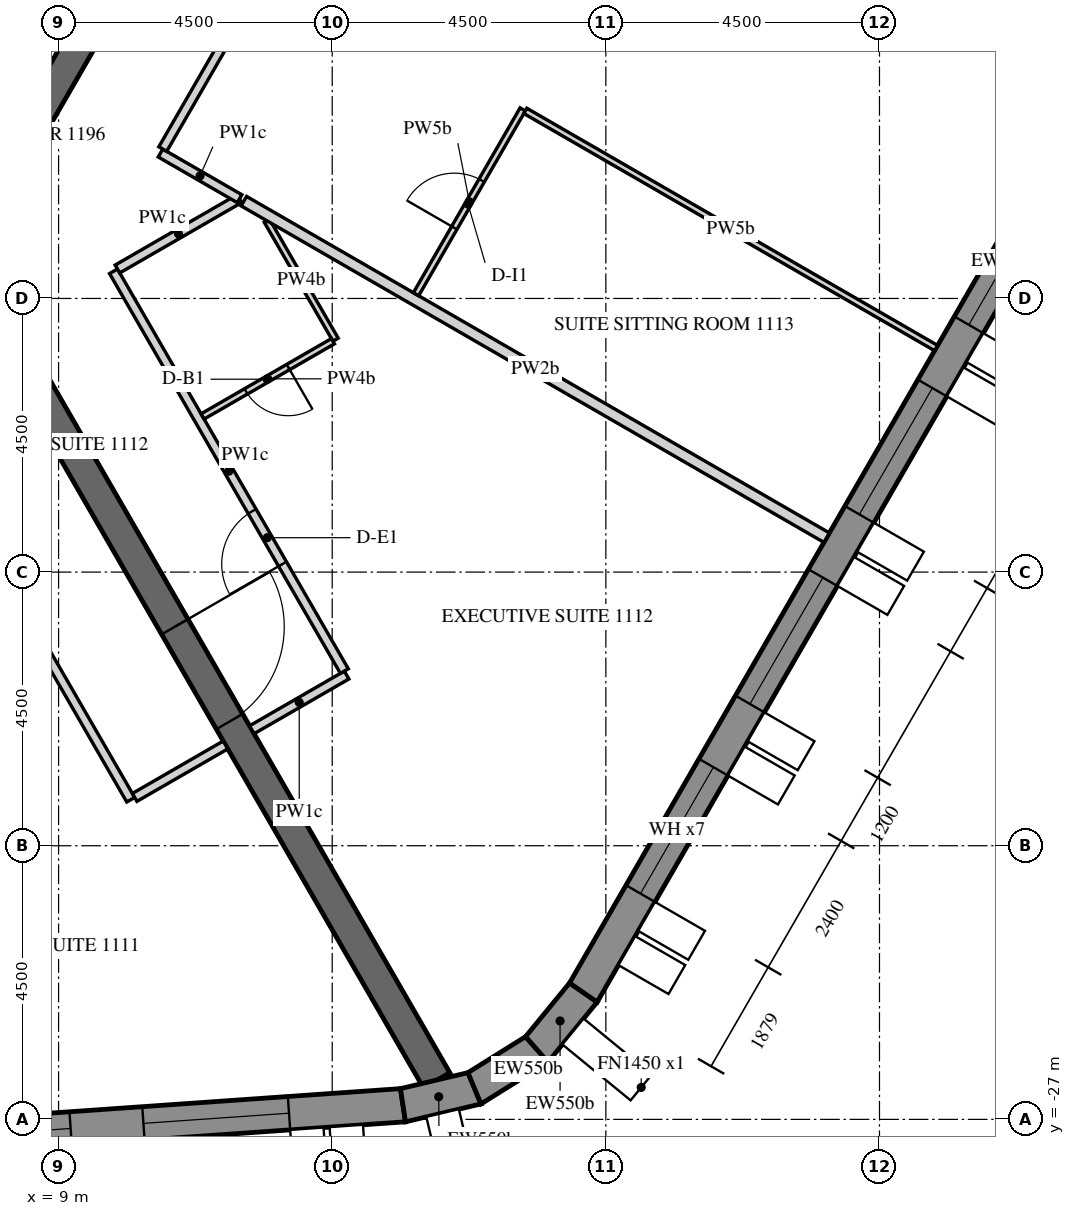
"""IFC4 building model, lengths in metres.
Left out: names, types, materials, properties, quantities, classifications, styles, units other than length and angle.
Written with IfcOpenShell. Run it as: python <this file> out.ifc"""

import sys

from ifc_helpers import new_model, si_unit, direction, frame, frame_2d, origin, place, context, subcontext, project, spatial, polyline, rectangle, outline, extrude, element, fill, save


model = new_model("IFC4")
c1 = context("Model", 3, precision=1e-05, world=origin(), true_north=direction((0.0, 1.0)))
c2 = subcontext(c1, "Body", "Model", "MODEL_VIEW")
j1 = project(units=[si_unit("LENGTHUNIT", "METRE"), si_unit("PLANEANGLEUNIT", "RADIAN")], contexts=[c1])
p1 = place(None, origin())
s1 = spatial("IfcSite", under=j1, at=p1, CompositionType="ELEMENT")
p2 = place(p1, origin())
s2 = spatial("IfcBuilding", under=s1, at=p2, CompositionType="ELEMENT")
p3 = place(p2, frame((0.0, 0.0, 152.7)))
s3 = spatial("IfcBuildingStorey", under=s2, at=p3, CompositionType="ELEMENT", Elevation=152.7)
p4 = place(p3, frame((-13.026, -28.704, 0.0), z_axis=(0.0, 0.0, 1.0), x_axis=(0.99756406806, 0.069756219185, 0.0)))
e1 = element("IfcWall", 1, at=p4, inside=s3, PredefinedType="SOLIDWALL", context=c2, shape_type="SweptSolid", body=[
    extrude(outline(polyline([(-0.026, -0.275), (27.78, -0.275), (27.735, 0.275), (0.026, 0.275), (-0.026, -0.275)])), origin(), (0.0, 0.0, 1.0), 3.75),
])
p5 = place(p4, frame((1.879, 0.0, 0.9)))
e2 = element("IfcOpeningElement", 2, at=p5, cuts=e1, PredefinedType="OPENING", context=c2, shape_type="SweptSolid", body=[
    extrude(rectangle(XDim=2.4, YDim=2.4, at=frame_2d((1.2, 1.2))), frame((0.0, 0.285, 0.0), z_axis=(0.0, -1.0, 0.0), x_axis=(1.0, 0.0, 0.0)), (0.0, 0.0, 1.0), 0.57),
])
p6 = place(p4, frame((5.479, 0.0, 0.9)))
e3 = element("IfcOpeningElement", 3, at=p6, cuts=e1, PredefinedType="OPENING", context=c2, shape_type="SweptSolid", body=[
    extrude(rectangle(XDim=2.4, YDim=2.4, at=frame_2d((1.2, 1.2))), frame((0.0, 0.285, 0.0), z_axis=(0.0, -1.0, 0.0), x_axis=(1.0, 0.0, 0.0)), (0.0, 0.0, 1.0), 0.57),
])
p7 = place(p4, frame((9.079, 0.0, 0.9)))
e4 = element("IfcOpeningElement", 4, at=p7, cuts=e1, PredefinedType="OPENING", context=c2, shape_type="SweptSolid", body=[
    extrude(rectangle(XDim=2.4, YDim=2.4, at=frame_2d((1.2, 1.2))), frame((0.0, 0.285, 0.0), z_axis=(0.0, -1.0, 0.0), x_axis=(1.0, 0.0, 0.0)), (0.0, 0.0, 1.0), 0.57),
])
p8 = place(p4, frame((12.679, 0.0, 0.9)))
e5 = element("IfcOpeningElement", 5, at=p8, cuts=e1, PredefinedType="OPENING", context=c2, shape_type="SweptSolid", body=[
    extrude(rectangle(XDim=2.4, YDim=2.4, at=frame_2d((1.2, 1.2))), frame((0.0, 0.285, 0.0), z_axis=(0.0, -1.0, 0.0), x_axis=(1.0, 0.0, 0.0)), (0.0, 0.0, 1.0), 0.57),
])
p9 = place(p4, frame((16.279, 0.0, 0.9)))
e6 = element("IfcOpeningElement", 6, at=p9, cuts=e1, PredefinedType="OPENING", context=c2, shape_type="SweptSolid", body=[
    extrude(rectangle(XDim=2.4, YDim=2.4, at=frame_2d((1.2, 1.2))), frame((0.0, 0.285, 0.0), z_axis=(0.0, -1.0, 0.0), x_axis=(1.0, 0.0, 0.0)), (0.0, 0.0, 1.0), 0.57),
])
p10 = place(p4, frame((19.879, 0.0, 0.9)))
e7 = element("IfcOpeningElement", 7, at=p10, cuts=e1, PredefinedType="OPENING", context=c2, shape_type="SweptSolid", body=[
    extrude(rectangle(XDim=2.4, YDim=2.4, at=frame_2d((1.2, 1.2))), frame((0.0, 0.285, 0.0), z_axis=(0.0, -1.0, 0.0), x_axis=(1.0, 0.0, 0.0)), (0.0, 0.0, 1.0), 0.57),
])
p11 = place(p4, frame((23.479, 0.0, 0.9)))
e8 = element("IfcOpeningElement", 8, at=p11, cuts=e1, PredefinedType="OPENING", context=c2, shape_type="SweptSolid", body=[
    extrude(rectangle(XDim=2.4, YDim=2.4, at=frame_2d((1.2, 1.2))), frame((0.0, 0.285, 0.0), z_axis=(0.0, -1.0, 0.0), x_axis=(1.0, 0.0, 0.0)), (0.0, 0.0, 1.0), 0.57),
])
p12 = place(p3, frame((14.664, -26.767, 0.0), z_axis=(0.0, 0.0, 1.0), x_axis=(0.973063591128, 0.230536868247, 0.0)))
e9 = element("IfcWall", 9, at=p12, inside=s3, PredefinedType="SOLIDWALL", context=c2, shape_type="SweptSolid", body=[
    extrude(outline(polyline([(-0.022, -0.275), (1.253, -0.275), (1.163, 0.275), (0.022, 0.275), (-0.022, -0.275)])), origin(), (0.0, 0.0, 1.0), 3.75),
])
p13 = place(p3, frame((15.84, -26.489, 0.0), z_axis=(0.0, 0.0, 1.0), x_axis=(0.848009655012, 0.52998077796, 0.0)))
e10 = element("IfcWall", 10, at=p13, inside=s3, PredefinedType="SOLIDWALL", context=c2, shape_type="SweptSolid", body=[
    extrude(outline(polyline([(-0.045, -0.275), (1.253, -0.275), (1.163, 0.275), (0.045, 0.275), (-0.045, -0.275)])), origin(), (0.0, 0.0, 1.0), 3.75),
])
p14 = place(p3, frame((16.864, -25.848, 0.0), z_axis=(0.0, 0.0, 1.0), x_axis=(0.633842757806, 0.773461930787, 0.0)))
e11 = element("IfcWall", 11, at=p14, inside=s3, PredefinedType="SOLIDWALL", context=c2, shape_type="SweptSolid", body=[
    extrude(outline(polyline([(-0.045, -0.275), (1.231, -0.275), (1.186, 0.275), (0.045, 0.275), (-0.045, -0.275)])), origin(), (0.0, 0.0, 1.0), 3.75),
])
p15 = place(p3, frame((17.63, -24.914, 0.0), z_axis=(0.0, 0.0, 1.0), x_axis=(0.499998569178, 0.866026229868, 0.0)))
e12 = element("IfcWall", 12, at=p15, inside=s3, PredefinedType="SOLIDWALL", context=c2, shape_type="SweptSolid", body=[
    extrude(outline(polyline([(-0.022, -0.275), (27.783, -0.275), (27.732, 0.275), (0.022, 0.275), (-0.022, -0.275)])), origin(), (0.0, 0.0, 1.0), 3.75),
])
p16 = place(p15, frame((1.879, 0.0, 0.9)))
e13 = element("IfcOpeningElement", 13, at=p16, cuts=e12, PredefinedType="OPENING", context=c2, shape_type="SweptSolid", body=[
    extrude(rectangle(XDim=2.4, YDim=2.4, at=frame_2d((1.2, 1.2))), frame((0.0, 0.285, 0.0), z_axis=(0.0, -1.0, 0.0), x_axis=(1.0, 0.0, 0.0)), (0.0, 0.0, 1.0), 0.57),
])
p17 = place(p15, frame((5.479, 0.0, 0.9)))
e14 = element("IfcOpeningElement", 14, at=p17, cuts=e12, PredefinedType="OPENING", context=c2, shape_type="SweptSolid", body=[
    extrude(rectangle(XDim=2.4, YDim=2.4, at=frame_2d((1.2, 1.2))), frame((0.0, 0.285, 0.0), z_axis=(0.0, -1.0, 0.0), x_axis=(1.0, 0.0, 0.0)), (0.0, 0.0, 1.0), 0.57),
])
p18 = place(p15, frame((9.079, 0.0, 0.9)))
e15 = element("IfcOpeningElement", 15, at=p18, cuts=e12, PredefinedType="OPENING", context=c2, shape_type="SweptSolid", body=[
    extrude(rectangle(XDim=2.4, YDim=2.4, at=frame_2d((1.2, 1.2))), frame((0.0, 0.285, 0.0), z_axis=(0.0, -1.0, 0.0), x_axis=(1.0, 0.0, 0.0)), (0.0, 0.0, 1.0), 0.57),
])
p19 = place(p15, frame((12.679, 0.0, 0.9)))
e16 = element("IfcOpeningElement", 16, at=p19, cuts=e12, PredefinedType="OPENING", context=c2, shape_type="SweptSolid", body=[
    extrude(rectangle(XDim=2.4, YDim=2.4, at=frame_2d((1.2, 1.2))), frame((0.0, 0.285, 0.0), z_axis=(0.0, -1.0, 0.0), x_axis=(1.0, 0.0, 0.0)), (0.0, 0.0, 1.0), 0.57),
])
p20 = place(p15, frame((16.279, 0.0, 0.9)))
e17 = element("IfcOpeningElement", 17, at=p20, cuts=e12, PredefinedType="OPENING", context=c2, shape_type="SweptSolid", body=[
    extrude(rectangle(XDim=2.4, YDim=2.4, at=frame_2d((1.2, 1.2))), frame((0.0, 0.285, 0.0), z_axis=(0.0, -1.0, 0.0), x_axis=(1.0, 0.0, 0.0)), (0.0, 0.0, 1.0), 0.57),
])
p21 = place(p15, frame((19.879, 0.0, 0.9)))
e18 = element("IfcOpeningElement", 18, at=p21, cuts=e12, PredefinedType="OPENING", context=c2, shape_type="SweptSolid", body=[
    extrude(rectangle(XDim=2.4, YDim=2.4, at=frame_2d((1.2, 1.2))), frame((0.0, 0.285, 0.0), z_axis=(0.0, -1.0, 0.0), x_axis=(1.0, 0.0, 0.0)), (0.0, 0.0, 1.0), 0.57),
])
p22 = place(p15, frame((23.479, 0.0, 0.9)))
e19 = element("IfcOpeningElement", 19, at=p22, cuts=e12, PredefinedType="OPENING", context=c2, shape_type="SweptSolid", body=[
    extrude(rectangle(XDim=2.4, YDim=2.4, at=frame_2d((1.2, 1.2))), frame((0.0, 0.285, 0.0), z_axis=(0.0, -1.0, 0.0), x_axis=(1.0, 0.0, 0.0)), (0.0, 0.0, 1.0), 0.57),
])
p23 = place(p3, frame((7.361, -12.75, 0.0), z_axis=(0.0, 0.0, 1.0), x_axis=(0.50000571537, 0.866022103989, 0.0)))
e20 = element("IfcWall", 20, at=p23, inside=s3, PredefinedType="SHEAR", context=c2, shape_type="SweptSolid", body=[
    extrude(outline(polyline([(-0.144, -0.25), (14.867, -0.25), (14.578, 0.25), (0.144, 0.25), (-0.144, -0.25)])), origin(), (0.0, 0.0, 1.0), 3.75),
])
p24 = place(p23, frame((6.49, 0.0, 0.0)))
e21 = element("IfcOpeningElement", 21, at=p24, cuts=e20, PredefinedType="OPENING", context=c2, shape_type="SweptSolid", body=[
    extrude(rectangle(XDim=1.8, YDim=2.4, at=frame_2d((0.9, 1.2))), frame((0.0, 0.26, 0.0), z_axis=(0.0, -1.0, 0.0), x_axis=(1.0, 0.0, 0.0)), (0.0, 0.0, 1.0), 0.52),
])
p25 = place(p3, frame((7.506, -13.0, 0.0), z_axis=(0.0, 0.0, 1.0), x_axis=(0.499988271576, -0.866032175087, 0.0)))
e22 = element("IfcWall", 22, at=p25, inside=s3, PredefinedType="SHEAR", context=c2, shape_type="SweptSolid", body=[
    extrude(rectangle(XDim=15.424, YDim=0.5, at=frame_2d((7.712, 0.0))), origin(), (0.0, 0.0, 1.0), 3.75),
])
p26 = place(p25, frame((6.812, 0.0, 0.0)))
e23 = element("IfcOpeningElement", 23, at=p26, cuts=e22, PredefinedType="OPENING", context=c2, shape_type="SweptSolid", body=[
    extrude(rectangle(XDim=1.8, YDim=2.4, at=frame_2d((0.9, 1.2))), frame((0.0, 0.26, 0.0), z_axis=(0.0, -1.0, 0.0), x_axis=(1.0, 0.0, 0.0)), (0.0, 0.0, 1.0), 0.52),
])
p27 = place(p3, frame((5.673, -9.825, 0.0), z_axis=(0.0, 0.0, 1.0), x_axis=(0.499995046907, 0.866028263435, 0.0)))
e24 = element("IfcWall", 24, at=p27, inside=s3, PredefinedType="SHEAR", context=c2, shape_type="SweptSolid", body=[
    extrude(outline(polyline([(-0.101, -0.175), (11.446, -0.175), (11.244, 0.175), (0.101, 0.175), (-0.101, -0.175)])), origin(), (0.0, 0.0, 1.0), 3.75),
])
p28 = place(p27, frame((4.801, 0.0, 0.0)))
e25 = element("IfcOpeningElement", 25, at=p28, cuts=e24, PredefinedType="OPENING", context=c2, shape_type="SweptSolid", body=[
    extrude(rectangle(XDim=1.8, YDim=2.4, at=frame_2d((0.9, 1.2))), frame((0.0, 0.185, 0.0), z_axis=(0.0, -1.0, 0.0), x_axis=(1.0, 0.0, 0.0)), (0.0, 0.0, 1.0), 0.37),
])
p29 = place(p3, frame((6.178, -14.8, 0.0), z_axis=(0.0, 0.0, 1.0), x_axis=(0.499984309814, -0.866034462328, 0.0)))
e26 = element("IfcWall", 26, at=p29, inside=s3, PredefinedType="PARTITIONING", context=c2, shape_type="SweptSolid", body=[
    extrude(rectangle(XDim=8.017, YDim=0.15, at=frame_2d((4.008, 0.0))), origin(), (0.0, 0.0, 1.0), 2.823),
])
p30 = place(p3, frame((10.251, -21.705, 0.0), z_axis=(0.0, 0.0, 1.0), x_axis=(0.866013532718, 0.500020560727, 0.0)))
e27 = element("IfcWall", 27, at=p30, inside=s3, PredefinedType="PARTITIONING", context=c2, shape_type="SweptSolid", body=[
    extrude(rectangle(XDim=1.725, YDim=0.15, at=frame_2d((0.863, 0.0))), origin(), (0.0, 0.0, 1.0), 2.823),
])
p31 = place(p3, frame((12.178, -20.593, 0.0), z_axis=(0.0, 0.0, 1.0), x_axis=(0.866047807691, 0.499961193289, 0.0)))
e28 = element("IfcWall", 28, at=p31, inside=s3, PredefinedType="PARTITIONING", context=c2, shape_type="SweptSolid", body=[
    extrude(rectangle(XDim=1.8, YDim=0.15, at=frame_2d((0.9, 0.0))), origin(), (0.0, 0.0, 1.0), 2.823),
])
p32 = place(p3, frame((13.699, -19.628, 0.0), z_axis=(0.0, 0.0, 1.0), x_axis=(-0.499998968938, 0.866025999068, 0.0)))
e29 = element("IfcWall", 29, at=p32, inside=s3, PredefinedType="PARTITIONING", context=c2, shape_type="SweptSolid", body=[
    extrude(rectangle(XDim=7.592, YDim=0.15, at=frame_2d((3.796, 0.0))), origin(), (0.0, 0.0, 1.0), 2.823),
])
p33 = place(p32, frame((2.033, 0.0, 0.0)))
e30 = element("IfcOpeningElement", 30, at=p33, cuts=e29, PredefinedType="OPENING", context=c2, shape_type="SweptSolid", body=[
    extrude(rectangle(XDim=1.0, YDim=2.1, at=frame_2d((0.5, 1.05))), frame((0.0, 0.085, 0.0), z_axis=(0.0, -1.0, 0.0), x_axis=(1.0, 0.0, 0.0)), (0.0, 0.0, 1.0), 0.17),
])
p34 = place(p3, frame((9.968, -13.016, 0.0), z_axis=(0.0, 0.0, 1.0), x_axis=(0.866022320763, 0.500005339912, 0.0)))
e31 = element("IfcWall", 31, at=p34, inside=s3, PredefinedType="PARTITIONING", context=c2, shape_type="SweptSolid", body=[
    extrude(rectangle(XDim=2.316, YDim=0.15, at=frame_2d((1.158, 0.0))), origin(), (0.0, 0.0, 1.0), 2.823),
])
p35 = place(p3, frame((11.977, -11.859, 0.0), z_axis=(0.0, 0.0, 1.0), x_axis=(-0.865993364801, 0.500055489042, 0.0)))
e32 = element("IfcWall", 32, at=p35, inside=s3, PredefinedType="PARTITIONING", context=c2, shape_type="SweptSolid", body=[
    extrude(rectangle(XDim=1.502, YDim=0.15, at=frame_2d((0.751, 0.0))), origin(), (0.0, 0.0, 1.0), 2.823),
])
p36 = place(p3, frame((10.714, -11.043, 0.0), z_axis=(0.0, 0.0, 1.0), x_axis=(0.500001980452, 0.866024260367, 0.0)))
e33 = element("IfcWall", 33, at=p36, inside=s3, PredefinedType="PARTITIONING", context=c2, shape_type="SweptSolid", body=[
    extrude(rectangle(XDim=12.752, YDim=0.15, at=frame_2d((6.376, 0.0))), origin(), (0.0, 0.0, 1.0), 2.823),
])
p37 = place(p36, frame((3.625, 0.0, 0.0)))
e34 = element("IfcOpeningElement", 34, at=p37, cuts=e33, PredefinedType="OPENING", context=c2, shape_type="SweptSolid", body=[
    extrude(rectangle(XDim=1.0, YDim=2.1, at=frame_2d((0.5, 1.05))), frame((0.0, 0.085, 0.0), z_axis=(0.0, -1.0, 0.0), x_axis=(1.0, 0.0, 0.0)), (0.0, 0.0, 1.0), 0.17),
])
p38 = place(p36, frame((11.602, 0.0, 0.0)))
e35 = element("IfcOpeningElement", 35, at=p38, cuts=e33, PredefinedType="OPENING", context=c2, shape_type="SweptSolid", body=[
    extrude(rectangle(XDim=1.0, YDim=2.1, at=frame_2d((0.5, 1.05))), frame((0.0, 0.085, 0.0), z_axis=(0.0, -1.0, 0.0), x_axis=(1.0, 0.0, 0.0)), (0.0, 0.0, 1.0), 0.17),
])
p39 = place(p3, frame((12.426, -12.223, 0.0), z_axis=(0.0, 0.0, 1.0), x_axis=(0.499919032186, -0.866072145528, 0.0)))
e36 = element("IfcWall", 36, at=p39, inside=s3, PredefinedType="PARTITIONING", context=c2, shape_type="SweptSolid", body=[
    extrude(rectangle(XDim=2.258, YDim=0.1, at=frame_2d((1.129, 0.0))), origin(), (0.0, 0.0, 1.0), 2.823),
])
p40 = place(p3, frame((13.512, -14.203, 0.0), z_axis=(0.0, 0.0, 1.0), x_axis=(-0.866006523861, -0.500032699561, 0.0)))
e37 = element("IfcWall", 37, at=p40, inside=s3, PredefinedType="PARTITIONING", context=c2, shape_type="SweptSolid", body=[
    extrude(rectangle(XDim=2.475, YDim=0.1, at=frame_2d((1.237, 0.0))), origin(), (0.0, 0.0, 1.0), 2.823),
])
p41 = place(p40, frame((0.85, 0.0, 0.0)))
e38 = element("IfcOpeningElement", 38, at=p41, cuts=e37, PredefinedType="OPENING", context=c2, shape_type="SweptSolid", body=[
    extrude(rectangle(XDim=0.8, YDim=2.1, at=frame_2d((0.4, 1.05))), frame((0.0, 0.06, 0.0), z_axis=(0.0, -1.0, 0.0), x_axis=(1.0, 0.0, 0.0)), (0.0, 0.0, 1.0), 0.12),
])
p42 = place(p3, frame((21.631, -17.433, 0.0), z_axis=(0.0, 0.0, 1.0), x_axis=(-0.866031296205, 0.499989793889, 0.0)))
e39 = element("IfcWall", 39, at=p42, inside=s3, PredefinedType="PARTITIONING", context=c2, shape_type="SweptSolid", body=[
    extrude(rectangle(XDim=11.067, YDim=0.18, at=frame_2d((5.534, 0.0))), origin(), (0.0, 0.0, 1.0), 2.823),
])
p43 = place(p3, frame((14.878, -13.43, 0.0), z_axis=(0.0, 0.0, 1.0), x_axis=(0.500021481416, 0.866013001128, 0.0)))
e40 = element("IfcWall", 40, at=p43, inside=s3, PredefinedType="PARTITIONING", context=c2, shape_type="SweptSolid", body=[
    extrude(rectangle(XDim=3.51, YDim=0.1, at=frame_2d((1.755, 0.0))), origin(), (0.0, 0.0, 1.0), 2.823),
])
p44 = place(p43, frame((1.26, 0.0, 0.0)))
e41 = element("IfcOpeningElement", 41, at=p44, cuts=e40, PredefinedType="OPENING", context=c2, shape_type="SweptSolid", body=[
    extrude(rectangle(XDim=0.9, YDim=2.1, at=frame_2d((0.45, 1.05))), frame((0.0, 0.06, 0.0), z_axis=(0.0, -1.0, 0.0), x_axis=(1.0, 0.0, 0.0)), (0.0, 0.0, 1.0), 0.12),
])
p45 = place(p3, frame((16.676, -10.416, 0.0), z_axis=(0.0, 0.0, 1.0), x_axis=(0.866034953203, -0.499983459557, 0.0)))
e42 = element("IfcWall", 42, at=p45, inside=s3, PredefinedType="PARTITIONING", context=c2, shape_type="SweptSolid", body=[
    extrude(rectangle(XDim=7.8, YDim=0.1, at=frame_2d((3.9, 0.0))), origin(), (0.0, 0.0, 1.0), 2.823),
])
p46 = place(p10, frame((0.0, 0.205, 0.0)))
e43 = element("IfcWindow", 43, at=p46, inside=s3, PartitioningType="DOUBLE_PANEL_VERTICAL", PredefinedType="WINDOW", context=c2, shape_type="SweptSolid", body=[
    extrude(rectangle(XDim=2.4, YDim=2.4, at=frame_2d((1.2, 1.2))), frame((0.0, 0.03, 0.0), z_axis=(0.0, -1.0, 0.0), x_axis=(1.0, 0.0, 0.0)), (0.0, 0.0, 1.0), 0.06),
])
fill(e7, e43)
p47 = place(p11, frame((0.0, 0.205, 0.0)))
e44 = element("IfcWindow", 44, at=p47, inside=s3, PartitioningType="DOUBLE_PANEL_VERTICAL", PredefinedType="WINDOW", context=c2, shape_type="SweptSolid", body=[
    extrude(rectangle(XDim=2.4, YDim=2.4, at=frame_2d((1.2, 1.2))), frame((0.0, 0.03, 0.0), z_axis=(0.0, -1.0, 0.0), x_axis=(1.0, 0.0, 0.0)), (0.0, 0.0, 1.0), 0.06),
])
fill(e8, e44)
p48 = place(p16, frame((0.0, 0.205, 0.0)))
e45 = element("IfcWindow", 45, at=p48, inside=s3, PartitioningType="DOUBLE_PANEL_VERTICAL", PredefinedType="WINDOW", context=c2, shape_type="SweptSolid", body=[
    extrude(rectangle(XDim=2.4, YDim=2.4, at=frame_2d((1.2, 1.2))), frame((0.0, 0.03, 0.0), z_axis=(0.0, -1.0, 0.0), x_axis=(1.0, 0.0, 0.0)), (0.0, 0.0, 1.0), 0.06),
])
fill(e13, e45)
p49 = place(p17, frame((0.0, 0.205, 0.0)))
e46 = element("IfcWindow", 46, at=p49, inside=s3, PartitioningType="DOUBLE_PANEL_VERTICAL", PredefinedType="WINDOW", context=c2, shape_type="SweptSolid", body=[
    extrude(rectangle(XDim=2.4, YDim=2.4, at=frame_2d((1.2, 1.2))), frame((0.0, 0.03, 0.0), z_axis=(0.0, -1.0, 0.0), x_axis=(1.0, 0.0, 0.0)), (0.0, 0.0, 1.0), 0.06),
])
fill(e14, e46)
p50 = place(p18, frame((0.0, 0.205, 0.0)))
e47 = element("IfcWindow", 47, at=p50, inside=s3, PartitioningType="DOUBLE_PANEL_VERTICAL", PredefinedType="WINDOW", context=c2, shape_type="SweptSolid", body=[
    extrude(rectangle(XDim=2.4, YDim=2.4, at=frame_2d((1.2, 1.2))), frame((0.0, 0.03, 0.0), z_axis=(0.0, -1.0, 0.0), x_axis=(1.0, 0.0, 0.0)), (0.0, 0.0, 1.0), 0.06),
])
fill(e15, e47)
p51 = place(p19, frame((0.0, 0.205, 0.0)))
e48 = element("IfcWindow", 48, at=p51, inside=s3, PartitioningType="DOUBLE_PANEL_VERTICAL", PredefinedType="WINDOW", context=c2, shape_type="SweptSolid", body=[
    extrude(rectangle(XDim=2.4, YDim=2.4, at=frame_2d((1.2, 1.2))), frame((0.0, 0.03, 0.0), z_axis=(0.0, -1.0, 0.0), x_axis=(1.0, 0.0, 0.0)), (0.0, 0.0, 1.0), 0.06),
])
fill(e16, e48)
p52 = place(p26, origin())
e49 = element("IfcDoor", 49, at=p52, inside=s3, OperationType="DOUBLE_DOOR_SINGLE_SWING", PredefinedType="DOOR", context=c2, shape_type="SweptSolid", body=[
    extrude(rectangle(XDim=1.8, YDim=2.4, at=frame_2d((0.9, 1.2))), frame((0.0, 0.025, 0.0), z_axis=(0.0, -1.0, 0.0), x_axis=(1.0, 0.0, 0.0)), (0.0, 0.0, 1.0), 0.05),
])
fill(e23, e49)
p53 = place(p33, origin())
e50 = element("IfcDoor", 50, at=p53, inside=s3, OperationType="SINGLE_SWING_LEFT", PredefinedType="DOOR", context=c2, shape_type="SweptSolid", body=[
    extrude(rectangle(XDim=1.0, YDim=2.1, at=frame_2d((0.5, 1.05))), frame((0.0, 0.025, 0.0), z_axis=(0.0, -1.0, 0.0), x_axis=(1.0, 0.0, 0.0)), (0.0, 0.0, 1.0), 0.05),
])
fill(e30, e50)
p54 = place(p41, origin())
e51 = element("IfcDoor", 51, at=p54, inside=s3, OperationType="SINGLE_SWING_RIGHT", PredefinedType="DOOR", context=c2, shape_type="SweptSolid", body=[
    extrude(rectangle(XDim=0.8, YDim=2.1, at=frame_2d((0.4, 1.05))), frame((0.0, 0.025, 0.0), z_axis=(0.0, -1.0, 0.0), x_axis=(1.0, 0.0, 0.0)), (0.0, 0.0, 1.0), 0.05),
])
fill(e38, e51)
p55 = place(p44, origin())
e52 = element("IfcDoor", 52, at=p55, inside=s3, OperationType="SINGLE_SWING_RIGHT", PredefinedType="DOOR", context=c2, shape_type="SweptSolid", body=[
    extrude(rectangle(XDim=0.9, YDim=2.1, at=frame_2d((0.45, 1.05))), frame((0.0, 0.025, 0.0), z_axis=(0.0, -1.0, 0.0), x_axis=(1.0, 0.0, 0.0)), (0.0, 0.0, 1.0), 0.05),
])
fill(e41, e52)
save(model, sys.argv[1])
